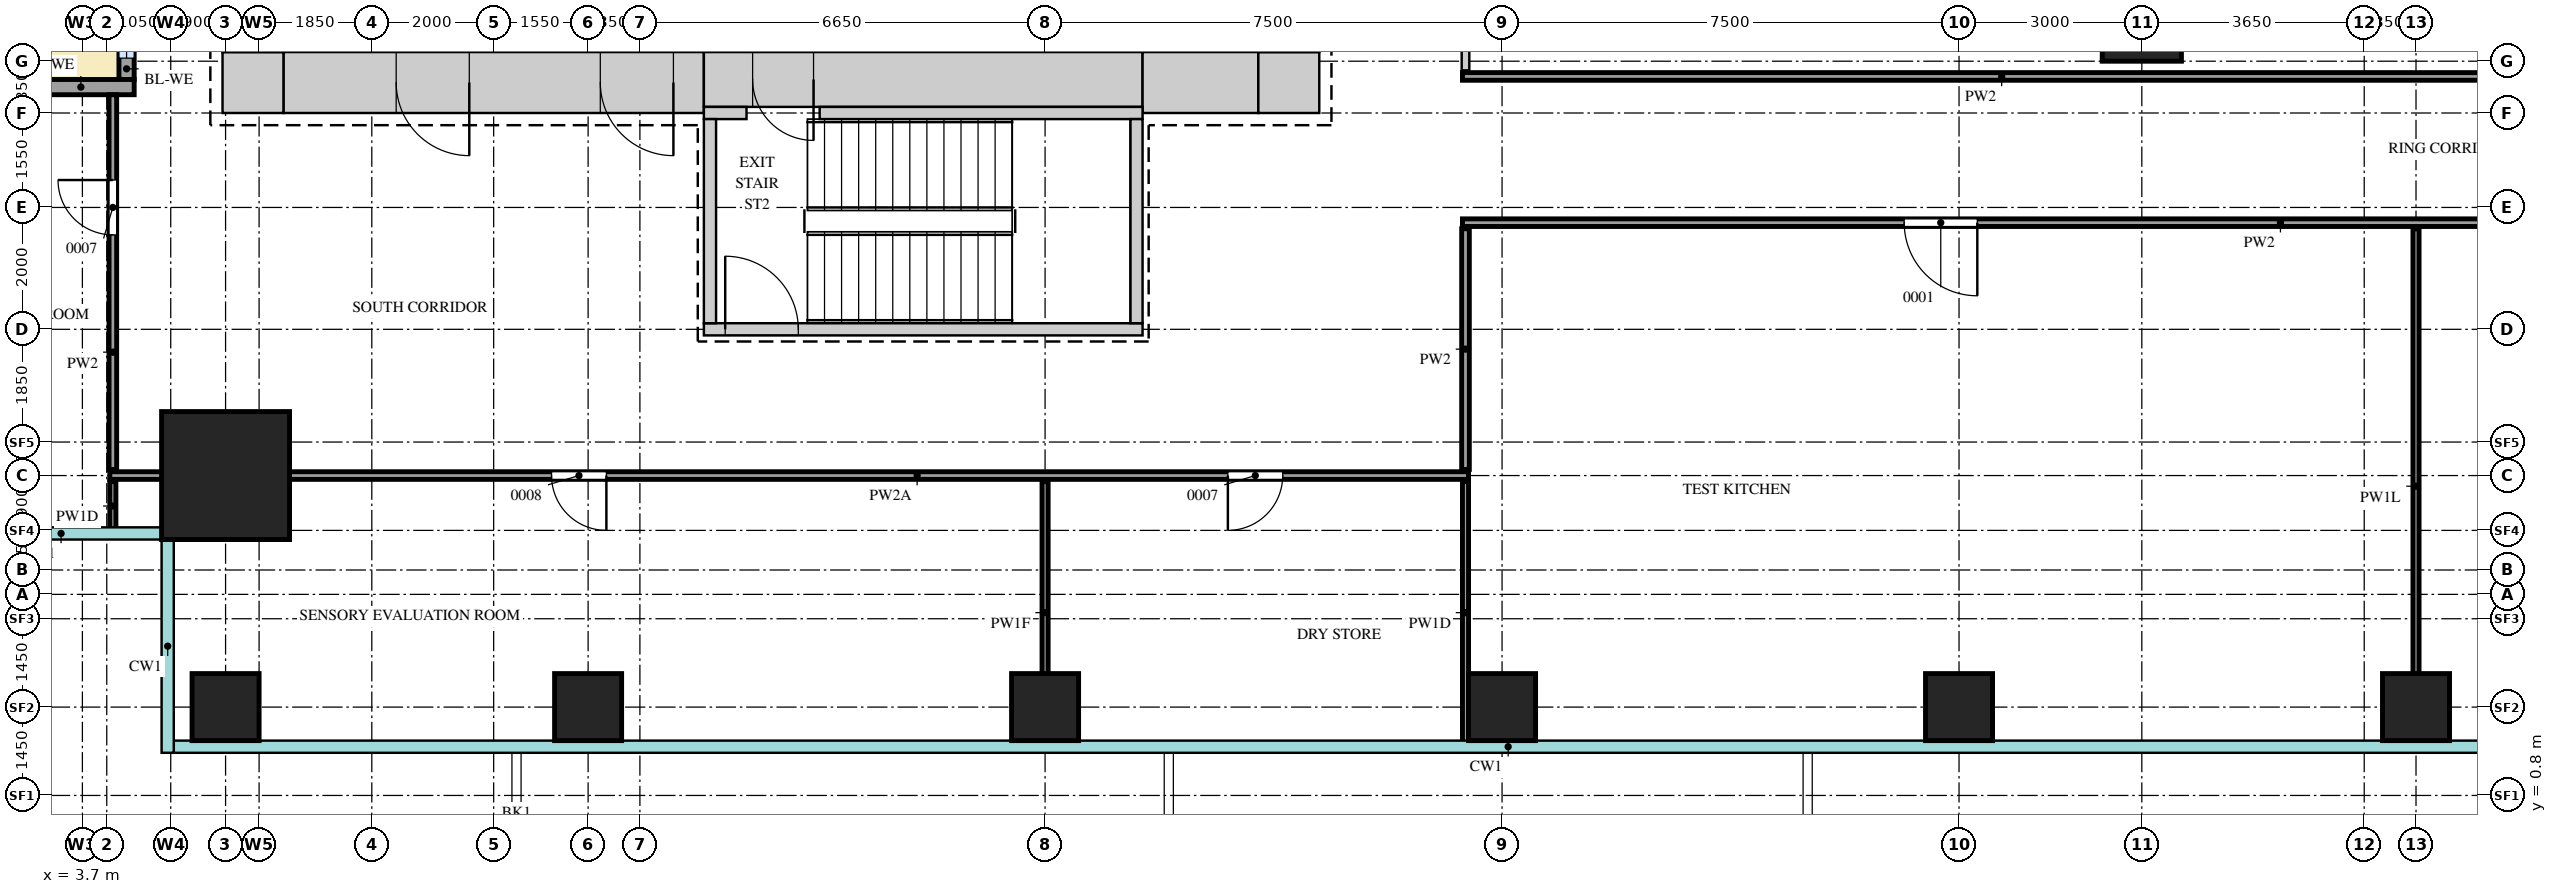
"""IFC4 building model, lengths in metres.
Left out: names, types, materials, properties, quantities, classifications, styles, units other than length and angle.
Written with IfcOpenShell. Run it as: python <this file> out.ifc"""

import sys

from ifc_helpers import new_model, si_unit, direction, frame, frame_2d, origin, origin_2d, place, context, subcontext, project, spatial, rectangle, extrude, source, transform, mapped, element, fill, save


model = new_model("IFC4")
c1 = context("Model", 3, precision=1e-05, world=origin(), true_north=direction((0.0, 1.0)))
c2 = subcontext(c1, "Body", "Model", "MODEL_VIEW")
j1 = project(units=[si_unit("LENGTHUNIT", "METRE"), si_unit("PLANEANGLEUNIT", "RADIAN")], contexts=[c1])
p1 = place(None, origin())
s1 = spatial("IfcSite", under=j1, at=p1, CompositionType="ELEMENT")
p2 = place(p1, origin())
s2 = spatial("IfcBuilding", under=s1, at=p2, CompositionType="ELEMENT")
p3 = place(p2, frame((0.0, 0.0, 123.5)))
s3 = spatial("IfcBuildingStorey", under=s2, at=p3, CompositionType="ELEMENT", Elevation=123.5)
m1 = source(origin(), c2, "Body", "SweptSolid", [
    extrude(rectangle(XDim=6.9, YDim=1.0, at=frame_2d((3.45, 0.0))), origin(), (0.0, 0.0, 1.0), 4.1),
])
p4 = place(p3, frame((7.0, 12.5, 0.0), z_axis=(0.0, 0.0, 1.0), x_axis=(1.0, 0.0, 0.0)))
e1 = element("IfcWall", 1, at=p4, inside=s3, PredefinedType="SHEAR", context=c2, shape_type="MappedRepresentation", body=[
    mapped(m1, transform((0.0, 0.0, 0.0))),
])
m2 = source(origin(), c2, "Body", "SweptSolid", [
    extrude(rectangle(XDim=1.2, YDim=2.1, at=frame_2d((0.6, 1.05))), frame((0.0, 0.51, 0.0), z_axis=(0.0, -1.0, 0.0), x_axis=(1.0, 0.0, 0.0)), (0.0, 0.0, 1.0), 1.02),
])
p5 = place(p4, frame((5.2, 0.0, 0.0)))
e2 = element("IfcOpeningElement", 2, at=p5, cuts=e1, PredefinedType="OPENING", context=c2, shape_type="MappedRepresentation", body=[
    mapped(m2, transform((0.0, 0.0, 0.0))),
])
p6 = place(p4, frame((1.85, 0.0, 0.0)))
e3 = element("IfcOpeningElement", 3, at=p6, cuts=e1, PredefinedType="OPENING", context=c2, shape_type="MappedRepresentation", body=[
    mapped(m2, transform((0.0, 0.0, 0.0))),
])
m3 = source(origin(), c2, "Body", "SweptSolid", [
    extrude(rectangle(XDim=7.2, YDim=0.9, at=frame_2d((3.6, 0.0))), origin(), (0.0, 0.0, 1.0), 4.1),
])
p7 = place(p3, frame((13.9, 12.55, 0.0), z_axis=(0.0, 0.0, 1.0), x_axis=(1.0, 0.0, 0.0)))
e4 = element("IfcWall", 4, at=p7, inside=s3, PredefinedType="SHEAR", context=c2, shape_type="MappedRepresentation", body=[
    mapped(m3, transform((0.0, 0.0, 0.0))),
])
m4 = source(origin(), c2, "Body", "SweptSolid", [
    extrude(rectangle(XDim=1.0, YDim=2.1, at=frame_2d((0.5, 1.05))), frame((0.0, 0.46, 0.0), z_axis=(0.0, -1.0, 0.0), x_axis=(1.0, 0.0, 0.0)), (0.0, 0.0, 1.0), 0.92),
])
p8 = place(p7, frame((0.8, 0.0, 0.0)))
e5 = element("IfcOpeningElement", 5, at=p8, cuts=e4, PredefinedType="OPENING", context=c2, shape_type="MappedRepresentation", body=[
    mapped(m4, transform((0.0, 0.0, 0.0))),
])
m5 = source(origin(), c2, "Body", "SweptSolid", [
    extrude(rectangle(XDim=1.9, YDim=1.0, at=frame_2d((0.95, 0.0))), origin(), (0.0, 0.0, 1.0), 4.1),
])
p9 = place(p3, frame((21.1, 12.5, 0.0), z_axis=(0.0, 0.0, 1.0), x_axis=(1.0, 0.0, 0.0)))
e6 = element("IfcWall", 6, at=p9, inside=s3, PredefinedType="SHEAR", context=c2, shape_type="MappedRepresentation", body=[
    mapped(m5, transform((0.0, 0.0, 0.0))),
])
m6 = source(origin(), c2, "Body", "SweptSolid", [
    extrude(rectangle(XDim=1.0, YDim=1.0, at=frame_2d((0.5, 0.0))), origin(), (0.0, 0.0, 1.0), 4.1),
])
for number, where, z_axis, x_axis in (
    (7, (23.0, 12.5, 0.0), (0.0, 0.0, 1.0), (1.0, 0.0, 0.0)),
    (8, (6.0, 12.5, 0.0), (0.0, 0.0, 1.0), (1.0, 0.0, 0.0)),
):
    element("IfcWall", number, at=place(p3, frame(where, z_axis=z_axis, x_axis=x_axis)), inside=s3, PredefinedType="SHEAR", context=c2, shape_type="MappedRepresentation", body=[
        mapped(m6, transform((0.0, 0.0, 0.0))),
    ])
m7 = source(origin(), c2, "Body", "SweptSolid", [
    extrude(rectangle(XDim=0.7, YDim=0.2, at=frame_2d((0.35, 0.0))), origin(), (0.0, 0.0, 1.0), 4.1),
])
p10 = place(p3, frame((13.9, 12.0, 0.0), z_axis=(0.0, 0.0, 1.0), x_axis=(1.0, 0.0, 0.0)))
e9 = element("IfcWall", 9, at=p10, inside=s3, PredefinedType="SHEAR", context=c2, shape_type="MappedRepresentation", body=[
    mapped(m7, transform((0.0, 0.0, 0.0))),
])
m8 = source(origin(), c2, "Body", "SweptSolid", [
    extrude(rectangle(XDim=5.3, YDim=0.2, at=frame_2d((2.65, 0.0))), origin(), (0.0, 0.0, 1.0), 4.1),
])
p11 = place(p3, frame((15.8, 12.0, 0.0), z_axis=(0.0, 0.0, 1.0), x_axis=(1.0, 0.0, 0.0)))
e10 = element("IfcWall", 10, at=p11, inside=s3, PredefinedType="SHEAR", context=c2, shape_type="MappedRepresentation", body=[
    mapped(m8, transform((0.0, 0.0, 0.0))),
])
m9 = source(origin(), c2, "Body", "SweptSolid", [
    extrude(rectangle(XDim=7.2, YDim=0.2, at=frame_2d((3.6, 0.0))), origin(), (0.0, 0.0, 1.0), 4.1),
])
p12 = place(p3, frame((13.9, 8.45, 0.0), z_axis=(0.0, 0.0, 1.0), x_axis=(1.0, 0.0, 0.0)))
e11 = element("IfcWall", 11, at=p12, inside=s3, PredefinedType="SHEAR", context=c2, shape_type="MappedRepresentation", body=[
    mapped(m9, transform((0.0, 0.0, 0.0))),
])
m10 = source(origin(), c2, "Body", "SweptSolid", [
    extrude(rectangle(XDim=1.2, YDim=2.1, at=frame_2d((0.6, 1.05))), frame((0.0, 0.11, 0.0), z_axis=(0.0, -1.0, 0.0), x_axis=(1.0, 0.0, 0.0)), (0.0, 0.0, 1.0), 0.22),
])
p13 = place(p12, frame((0.35, 0.0, 0.0)))
e12 = element("IfcOpeningElement", 12, at=p13, cuts=e11, PredefinedType="OPENING", context=c2, shape_type="MappedRepresentation", body=[
    mapped(m10, transform((0.0, 0.0, 0.0))),
])
m11 = source(origin(), c2, "Body", "SweptSolid", [
    extrude(rectangle(XDim=3.35, YDim=0.2, at=frame_2d((1.675, 0.0))), origin(), (0.0, 0.0, 1.0), 4.1),
])
for number, where, z_axis, x_axis in (
    (13, (21.0, 8.55, 0.0), (0.0, 0.0, 1.0), (0.0, 1.0, 0.0)),
    (14, (14.0, 8.55, 0.0), (0.0, 0.0, 1.0), (0.0, 1.0, 0.0)),
):
    element("IfcWall", number, at=place(p3, frame(where, z_axis=z_axis, x_axis=x_axis)), inside=s3, PredefinedType="SHEAR", context=c2, shape_type="MappedRepresentation", body=[
        mapped(m11, transform((0.0, 0.0, 0.0))),
    ])
m12 = source(origin(), c2, "Body", "SweptSolid", [
    extrude(rectangle(XDim=2.1, YDim=2.1, at=origin_2d()), origin(), (0.0, 0.0, 1.0), 4.4),
])
p14 = place(p3, frame((6.05, 6.05, 0.0), z_axis=(0.0, 0.0, 1.0), x_axis=(1.0, 0.0, 0.0)))
e15 = element("IfcColumn", 15, at=p14, inside=s3, PredefinedType="COLUMN", context=c2, shape_type="MappedRepresentation", body=[
    mapped(m12, transform((0.0, 0.0, 0.0))),
])
m13 = source(origin(), c2, "Body", "SweptSolid", [
    extrude(rectangle(XDim=1.1, YDim=1.1, at=origin_2d()), origin(), (0.0, 0.0, 1.0), 4.1),
])
for number, where, z_axis, x_axis in (
    (16, (6.05, 2.25, 0.0), (0.0, 0.0, 1.0), (1.0, 0.0, 0.0)),
    (17, (12.0, 2.25, 0.0), (0.0, 0.0, 1.0), (1.0, 0.0, 0.0)),
    (18, (19.5, 2.25, 0.0), (0.0, 0.0, 1.0), (1.0, 0.0, 0.0)),
    (19, (27.0, 2.25, 0.0), (0.0, 0.0, 1.0), (1.0, 0.0, 0.0)),
    (20, (34.5, 2.25, 0.0), (0.0, 0.0, 1.0), (1.0, 0.0, 0.0)),
    (21, (42.0, 2.25, 0.0), (0.0, 0.0, 1.0), (1.0, 0.0, 0.0)),
):
    element("IfcColumn", number, at=place(p3, frame(where, z_axis=z_axis, x_axis=x_axis)), inside=s3, PredefinedType="COLUMN", context=c2, shape_type="MappedRepresentation", body=[
        mapped(m13, transform((0.0, 0.0, 0.0))),
    ])
m14 = source(origin(), c2, "Body", "SweptSolid", [
    extrude(rectangle(XDim=1.3, YDim=1.3, at=origin_2d()), origin(), (0.0, 0.0, 1.0), 4.1),
])
p15 = place(p3, frame((37.5, 13.5, 0.0), z_axis=(0.0, 0.0, 1.0), x_axis=(1.0, 0.0, 0.0)))
e22 = element("IfcColumn", 22, at=p15, inside=s3, PredefinedType="COLUMN", context=c2, shape_type="MappedRepresentation", body=[
    mapped(m14, transform((0.0, 0.0, 0.0))),
])
m15 = source(origin(), c2, "Body", "SweptSolid", [
    extrude(rectangle(XDim=6.4, YDim=0.25, at=frame_2d((3.2, 0.0))), origin(), (0.0, 0.0, 1.0), 3.5),
])
p16 = place(p3, frame((4.425, 12.55, 0.0), z_axis=(0.0, 0.0, 1.0), x_axis=(0.0, 1.0, 0.0)))
e23 = element("IfcWall", 23, at=p16, inside=s3, PredefinedType="SOLIDWALL", context=c2, shape_type="MappedRepresentation", body=[
    mapped(m15, transform((0.0, 0.0, 0.0))),
])
m16 = source(origin(), c2, "Body", "SweptSolid", [
    extrude(rectangle(XDim=1.65, YDim=2.4, at=frame_2d((0.825, 1.2))), frame((0.0, 0.135, 0.0), z_axis=(0.0, -1.0, 0.0), x_axis=(1.0, 0.0, 0.0)), (0.0, 0.0, 1.0), 0.27),
])
p17 = place(p16, frame((0.35, 0.0, 0.0)))
e24 = element("IfcOpeningElement", 24, at=p17, cuts=e23, PredefinedType="OPENING", context=c2, shape_type="MappedRepresentation", body=[
    mapped(m16, transform((0.0, 0.0, 0.0))),
])
p18 = place(p16, frame((4.4, 0.0, 0.0)))
e25 = element("IfcOpeningElement", 25, at=p18, cuts=e23, PredefinedType="OPENING", context=c2, shape_type="MappedRepresentation", body=[
    mapped(m16, transform((0.0, 0.0, 0.0))),
])
m17 = source(origin(), c2, "Body", "SweptSolid", [
    extrude(rectangle(XDim=1.8, YDim=2.4, at=frame_2d((0.9, 1.2))), frame((0.0, 0.135, 0.0), z_axis=(0.0, -1.0, 0.0), x_axis=(1.0, 0.0, 0.0)), (0.0, 0.0, 1.0), 0.27),
])
p19 = place(p16, frame((2.3, 0.0, 0.0)))
e26 = element("IfcOpeningElement", 26, at=p19, cuts=e23, PredefinedType="OPENING", context=c2, shape_type="MappedRepresentation", body=[
    mapped(m17, transform((0.0, 0.0, 0.0))),
])
m18 = source(origin(), c2, "Body", "SweptSolid", [
    extrude(rectangle(XDim=1.75, YDim=0.25, at=frame_2d((0.875, 0.0))), origin(), (0.0, 0.0, 1.0), 3.5),
])
p20 = place(p3, frame((2.8, 12.425, 0.0), z_axis=(0.0, 0.0, 1.0), x_axis=(1.0, 0.0, 0.0)))
e27 = element("IfcWall", 27, at=p20, inside=s3, PredefinedType="SOLIDWALL", context=c2, shape_type="MappedRepresentation", body=[
    mapped(m18, transform((0.0, 0.0, 0.0))),
])
m19 = source(origin(), c2, "Body", "SweptSolid", [
    extrude(rectangle(XDim=4.3, YDim=0.1, at=frame_2d((2.15, 0.0))), origin(), (0.0, 0.0, 1.0), 3.77),
])
p21 = place(p3, frame((19.5, 1.65, 0.0), z_axis=(0.0, 0.0, 1.0), x_axis=(0.0, 1.0, 0.0)))
e28 = element("IfcWall", 28, at=p21, inside=s3, PredefinedType="PARTITIONING", context=c2, shape_type="MappedRepresentation", body=[
    mapped(m19, transform((0.0, 0.0, 0.0))),
])
m20 = source(origin(), c2, "Body", "SweptSolid", [
    extrude(rectangle(XDim=4.3, YDim=0.1, at=frame_2d((2.15, 0.0))), origin(), (0.0, 0.0, 1.0), 4.2),
])
p22 = place(p3, frame((26.4, 1.65, 0.0), z_axis=(0.0, 0.0, 1.0), x_axis=(0.0, 1.0, 0.0)))
e29 = element("IfcWall", 29, at=p22, inside=s3, PredefinedType="PARTITIONING", context=c2, shape_type="MappedRepresentation", body=[
    mapped(m20, transform((0.0, 0.0, 0.0))),
])
m21 = source(origin(), c2, "Body", "SweptSolid", [
    extrude(rectangle(XDim=8.45, YDim=0.1, at=frame_2d((4.225, 0.0))), origin(), (0.0, 0.0, 1.0), 3.6),
])
p23 = place(p3, frame((42.0, 1.65, 0.0), z_axis=(0.0, 0.0, 1.0), x_axis=(0.0, 1.0, 0.0)))
e30 = element("IfcWall", 30, at=p23, inside=s3, PredefinedType="PARTITIONING", context=c2, shape_type="MappedRepresentation", body=[
    mapped(m21, transform((0.0, 0.0, 0.0))),
])
m22 = source(origin(), c2, "Body", "SweptSolid", [
    extrude(rectangle(XDim=0.8, YDim=0.1, at=frame_2d((0.4, 0.0))), origin(), (0.0, 0.0, 1.0), 4.2),
])
p24 = place(p3, frame((4.2, 5.15, 0.0), z_axis=(0.0, 0.0, 1.0), x_axis=(0.0, 1.0, 0.0)))
e31 = element("IfcWall", 31, at=p24, inside=s3, PredefinedType="PARTITIONING", context=c2, shape_type="MappedRepresentation", body=[
    mapped(m22, transform((0.0, 0.0, 0.0))),
])
m23 = source(origin(), c2, "Body", "SweptSolid", [
    extrude(rectangle(XDim=22.3, YDim=0.125, at=frame_2d((11.15, 0.0))), origin(), (0.0, 0.0, 1.0), 3.55),
])
p25 = place(p3, frame((4.15, 6.05, 0.0), z_axis=(0.0, 0.0, 1.0), x_axis=(1.0, 0.0, 0.0)))
e32 = element("IfcWall", 32, at=p25, inside=s3, PredefinedType="PARTITIONING", context=c2, shape_type="MappedRepresentation", body=[
    mapped(m23, transform((0.0, 0.0, 0.0))),
])
m24 = source(origin(), c2, "Body", "SweptSolid", [
    extrude(rectangle(XDim=0.9, YDim=2.1, at=frame_2d((0.45, 1.05))), frame((0.0, 0.073, 0.0), z_axis=(0.0, -1.0, 0.0), x_axis=(1.0, 0.0, 0.0)), (0.0, 0.0, 1.0), 0.145),
])
p26 = place(p25, frame((7.25, 0.0, 0.0)))
e33 = element("IfcOpeningElement", 33, at=p26, cuts=e32, PredefinedType="OPENING", context=c2, shape_type="MappedRepresentation", body=[
    mapped(m24, transform((0.0, 0.0, 0.0))),
])
p27 = place(p25, frame((18.35, 0.0, 0.0)))
e34 = element("IfcOpeningElement", 34, at=p27, cuts=e32, PredefinedType="OPENING", context=c2, shape_type="MappedRepresentation", body=[
    mapped(m24, transform((0.0, 0.0, 0.0))),
])
m25 = source(origin(), c2, "Body", "SweptSolid", [
    extrude(rectangle(XDim=6.15, YDim=0.125, at=frame_2d((3.075, 0.0))), origin(), (0.0, 0.0, 1.0), 4.2),
])
p28 = place(p3, frame((4.2, 6.15, 0.0), z_axis=(0.0, 0.0, 1.0), x_axis=(0.0, 1.0, 0.0)))
e35 = element("IfcWall", 35, at=p28, inside=s3, PredefinedType="PARTITIONING", context=c2, shape_type="MappedRepresentation", body=[
    mapped(m25, transform((0.0, 0.0, 0.0))),
])
p29 = place(p28, frame((3.85, 0.0, 0.0)))
e36 = element("IfcOpeningElement", 36, at=p29, cuts=e35, PredefinedType="OPENING", context=c2, shape_type="MappedRepresentation", body=[
    mapped(m24, transform((0.0, 0.0, 0.0))),
])
m26 = source(origin(), c2, "Body", "SweptSolid", [
    extrude(rectangle(XDim=3.95, YDim=0.125, at=frame_2d((1.975, 0.0))), origin(), (0.0, 0.0, 1.0), 4.2),
])
p30 = place(p3, frame((26.4, 6.15, 0.0), z_axis=(0.0, 0.0, 1.0), x_axis=(0.0, 1.0, 0.0)))
e37 = element("IfcWall", 37, at=p30, inside=s3, PredefinedType="PARTITIONING", context=c2, shape_type="MappedRepresentation", body=[
    mapped(m26, transform((0.0, 0.0, 0.0))),
])
m27 = source(origin(), c2, "Body", "SweptSolid", [
    extrude(rectangle(XDim=20.0, YDim=0.125, at=frame_2d((10.0, 0.0))), origin(), (0.0, 0.0, 1.0), 4.2),
])
p31 = place(p3, frame((26.35, 10.2, 0.0), z_axis=(0.0, 0.0, 1.0), x_axis=(1.0, 0.0, 0.0)))
e38 = element("IfcWall", 38, at=p31, inside=s3, PredefinedType="PARTITIONING", context=c2, shape_type="MappedRepresentation", body=[
    mapped(m27, transform((0.0, 0.0, 0.0))),
])
m28 = source(origin(), c2, "Body", "SweptSolid", [
    extrude(rectangle(XDim=1.2, YDim=2.1, at=frame_2d((0.6, 1.05))), frame((0.0, 0.073, 0.0), z_axis=(0.0, -1.0, 0.0), x_axis=(1.0, 0.0, 0.0)), (0.0, 0.0, 1.0), 0.145),
])
p32 = place(p31, frame((7.25, 0.0, 0.0)))
e39 = element("IfcOpeningElement", 39, at=p32, cuts=e38, PredefinedType="OPENING", context=c2, shape_type="MappedRepresentation", body=[
    mapped(m28, transform((0.0, 0.0, 0.0))),
])
p33 = place(p31, frame((18.4, 0.0, 0.0)))
e40 = element("IfcOpeningElement", 40, at=p33, cuts=e38, PredefinedType="OPENING", context=c2, shape_type="MappedRepresentation", body=[
    mapped(m28, transform((0.0, 0.0, 0.0))),
])
m29 = source(origin(), c2, "Body", "SweptSolid", [
    extrude(rectangle(XDim=17.7, YDim=0.125, at=frame_2d((8.85, 0.0))), origin(), (0.0, 0.0, 1.0), 4.2),
])
p34 = place(p3, frame((26.35, 12.6, 0.0), z_axis=(0.0, 0.0, 1.0), x_axis=(1.0, 0.0, 0.0)))
e41 = element("IfcWall", 41, at=p34, inside=s3, PredefinedType="PARTITIONING", context=c2, shape_type="MappedRepresentation", body=[
    mapped(m29, transform((0.0, 0.0, 0.0))),
])
m30 = source(origin(), c2, "Body", "SweptSolid", [
    extrude(rectangle(XDim=23.2, YDim=0.125, at=frame_2d((11.6, 0.0))), origin(), (0.0, 0.0, 1.0), 4.2),
])
p35 = place(p3, frame((26.4, 12.7, 0.0), z_axis=(0.0, 0.0, 1.0), x_axis=(0.0, 1.0, 0.0)))
e42 = element("IfcWall", 42, at=p35, inside=s3, PredefinedType="PARTITIONING", context=c2, shape_type="MappedRepresentation", body=[
    mapped(m30, transform((0.0, 0.0, 0.0))),
])
p36 = place(p35, frame((6.65, 0.0, 0.0)))
e43 = element("IfcOpeningElement", 43, at=p36, cuts=e42, PredefinedType="OPENING", context=c2, shape_type="MappedRepresentation", body=[
    mapped(m28, transform((0.0, 0.0, 0.0))),
])
m31 = source(origin(), c2, "Body", "SweptSolid", [
    extrude(rectangle(XDim=1.65, YDim=2.4, at=frame_2d((0.825, 1.2))), frame((0.0, 0.03, 0.0), z_axis=(0.0, -1.0, 0.0), x_axis=(1.0, 0.0, 0.0)), (0.0, 0.0, 1.0), 0.06),
])
p37 = place(p17, origin())
e44 = element("IfcWindow", 44, at=p37, inside=s3, PartitioningType="SINGLE_PANEL", PredefinedType="WINDOW", context=c2, shape_type="MappedRepresentation", body=[
    mapped(m31, transform((0.0, 0.0, 0.0))),
])
fill(e24, e44)
m32 = source(origin(), c2, "Body", "SweptSolid", [
    extrude(rectangle(XDim=1.2, YDim=2.1, at=frame_2d((0.6, 1.05))), frame((0.0, 0.45, 0.0), z_axis=(0.0, -1.0, 0.0), x_axis=(1.0, 0.0, 0.0)), (0.0, 0.0, 1.0), 0.9),
])
p38 = place(p5, origin())
e45 = element("IfcDoor", 45, at=p38, inside=s3, OperationType="SINGLE_SWING_RIGHT", PredefinedType="DOOR", context=c2, shape_type="MappedRepresentation", body=[
    mapped(m32, transform((0.0, 0.0, 0.0))),
])
fill(e2, e45)
p39 = place(p6, origin())
e46 = element("IfcDoor", 46, at=p39, inside=s3, OperationType="SINGLE_SWING_RIGHT", PredefinedType="DOOR", context=c2, shape_type="MappedRepresentation", body=[
    mapped(m32, transform((0.0, 0.0, 0.0))),
])
fill(e3, e46)
m33 = source(origin(), c2, "Body", "SweptSolid", [
    extrude(rectangle(XDim=1.0, YDim=2.1, at=frame_2d((0.5, 1.05))), frame((0.0, 0.4, 0.0), z_axis=(0.0, -1.0, 0.0), x_axis=(1.0, 0.0, 0.0)), (0.0, 0.0, 1.0), 0.8),
])
p40 = place(p8, origin())
e47 = element("IfcDoor", 47, at=p40, inside=s3, OperationType="SINGLE_SWING_RIGHT", PredefinedType="DOOR", context=c2, shape_type="MappedRepresentation", body=[
    mapped(m33, transform((0.0, 0.0, 0.0))),
])
fill(e5, e47)
m34 = source(origin(), c2, "Body", "SweptSolid", [
    extrude(rectangle(XDim=1.2, YDim=2.1, at=frame_2d((0.6, 1.05))), frame((0.0, 0.025, 0.0), z_axis=(0.0, -1.0, 0.0), x_axis=(1.0, 0.0, 0.0)), (0.0, 0.0, 1.0), 0.05),
])
p41 = place(p32, origin())
e48 = element("IfcDoor", 48, at=p41, inside=s3, OperationType="SINGLE_SWING_RIGHT", PredefinedType="DOOR", context=c2, shape_type="MappedRepresentation", body=[
    mapped(m34, transform((0.0, 0.0, 0.0))),
])
fill(e39, e48)
m35 = source(origin(), c2, "Body", "SweptSolid", [
    extrude(rectangle(XDim=0.9, YDim=2.1, at=frame_2d((0.45, 1.05))), frame((0.0, 0.025, 0.0), z_axis=(0.0, -1.0, 0.0), x_axis=(1.0, 0.0, 0.0)), (0.0, 0.0, 1.0), 0.05),
])
p42 = place(p26, origin())
e49 = element("IfcDoor", 49, at=p42, inside=s3, OperationType="SINGLE_SWING_RIGHT", PredefinedType="DOOR", context=c2, shape_type="MappedRepresentation", body=[
    mapped(m35, transform((0.0, 0.0, 0.0))),
])
fill(e33, e49)
p43 = place(p27, origin())
e50 = element("IfcDoor", 50, at=p43, inside=s3, OperationType="SINGLE_SWING_LEFT", PredefinedType="DOOR", context=c2, shape_type="MappedRepresentation", body=[
    mapped(m35, transform((0.0, 0.0, 0.0))),
])
fill(e34, e50)
p44 = place(p29, origin())
e51 = element("IfcDoor", 51, at=p44, inside=s3, OperationType="SINGLE_SWING_LEFT", PredefinedType="DOOR", context=c2, shape_type="MappedRepresentation", body=[
    mapped(m35, transform((0.0, 0.0, 0.0))),
])
fill(e36, e51)
p45 = place(p13, origin())
e52 = element("IfcDoor", 52, at=p45, inside=s3, OperationType="SINGLE_SWING_RIGHT", PredefinedType="DOOR", context=c2, shape_type="MappedRepresentation", body=[
    mapped(m34, transform((0.0, 0.0, 0.0))),
])
fill(e12, e52)
save(model, sys.argv[1])
